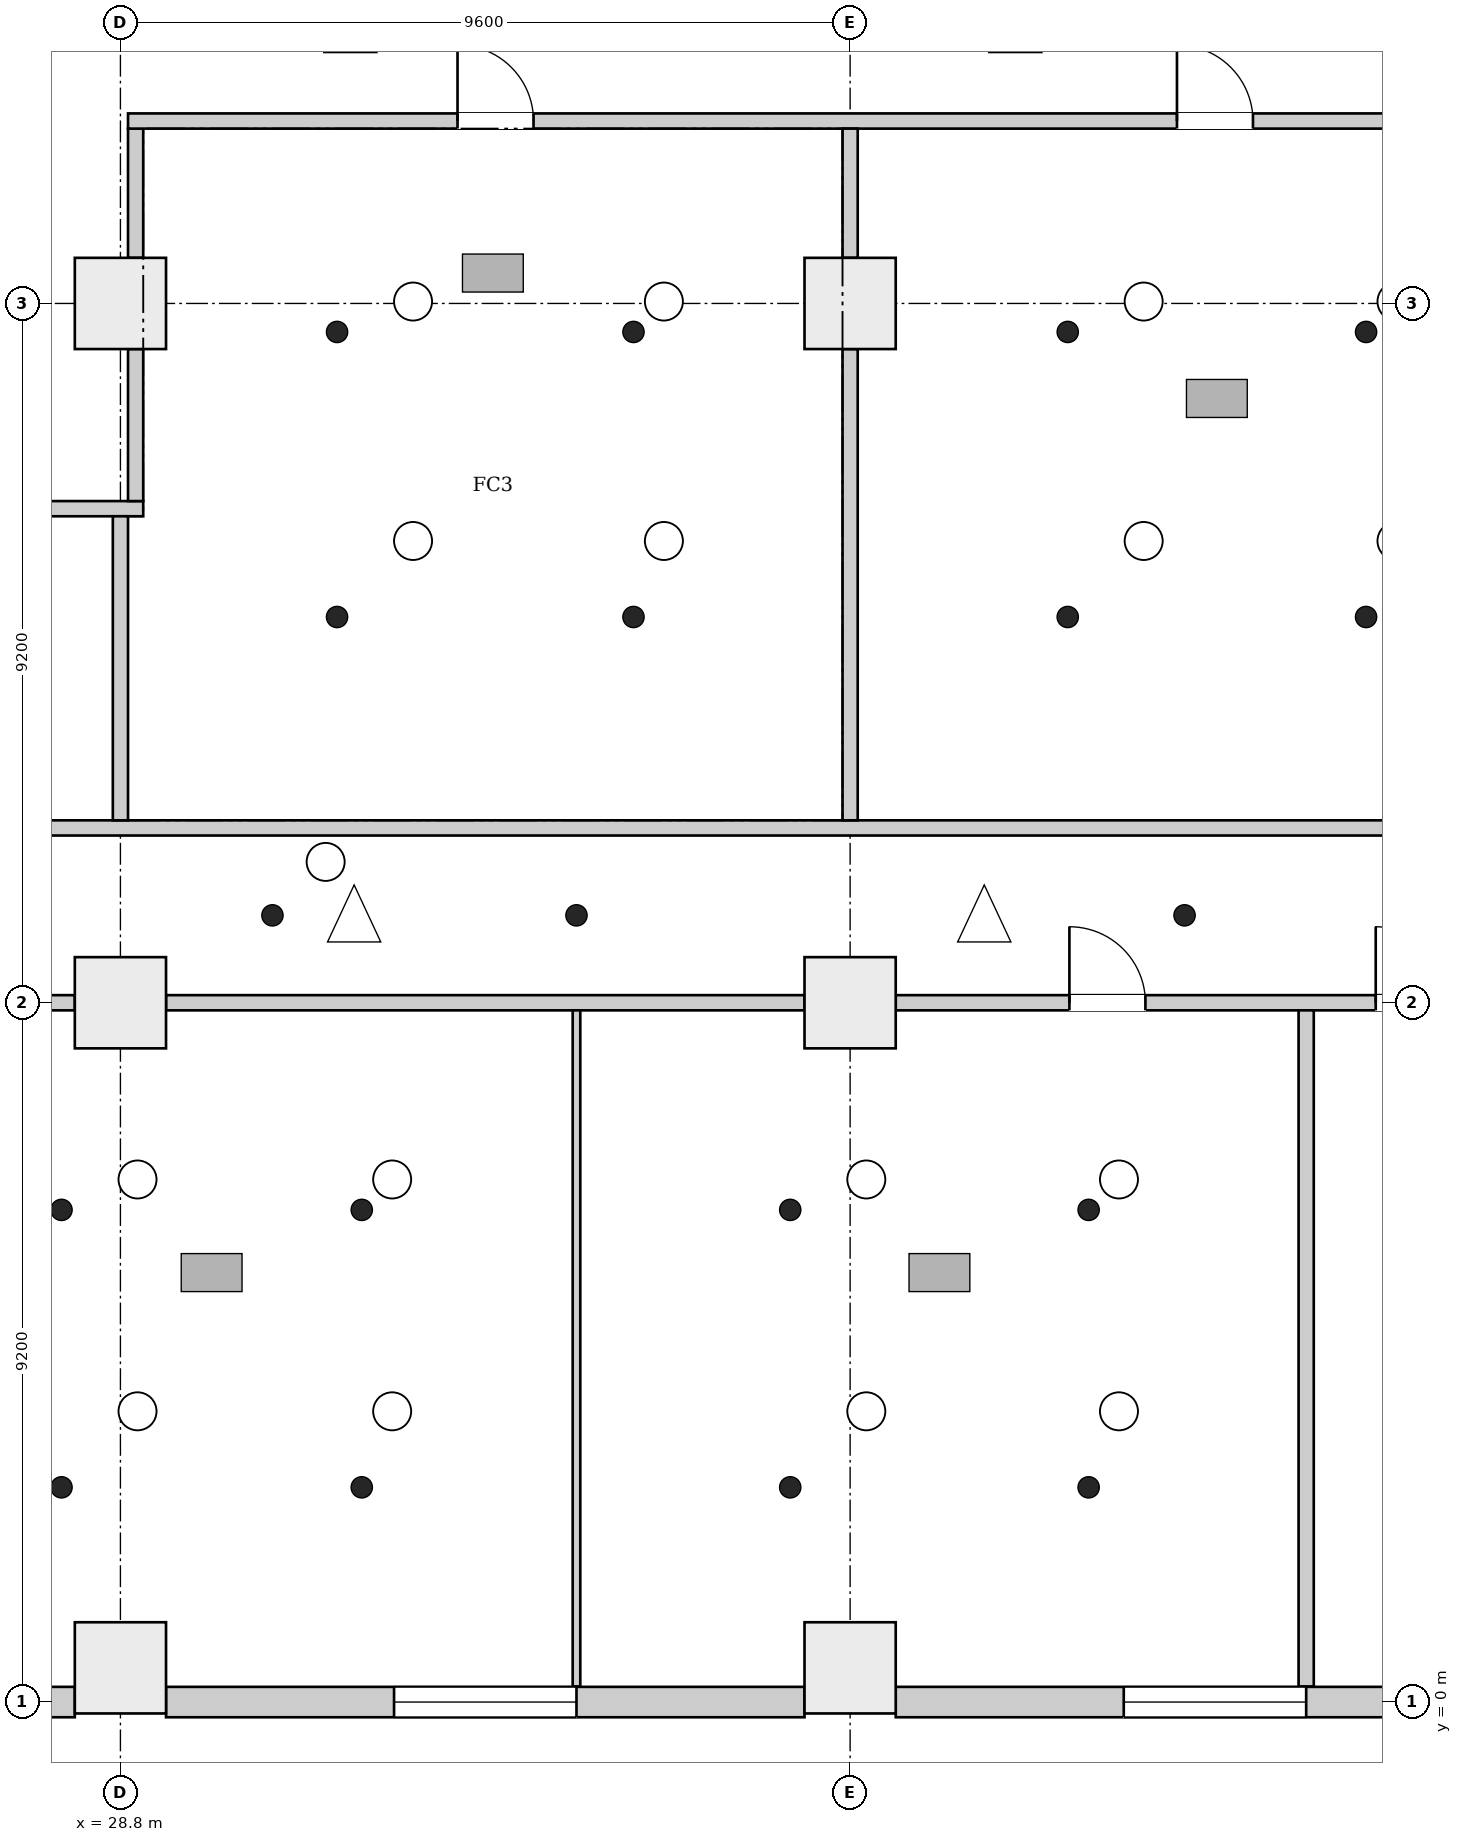
"""IFC4 building model, lengths in metres.
Left out: names, types, materials, properties, quantities, classifications, styles, units other than length and angle.
Written with IfcOpenShell. Run it as: python <this file> out.ifc"""

import sys

from ifc_helpers import new_model, si_unit, direction, frame, frame_2d, origin, origin_2d, place, context, subcontext, project, spatial, rectangle, extrude, element, fill, save


model = new_model("IFC4")
c1 = context("Model", 3, precision=1e-05, world=origin(), true_north=direction((0.0, 1.0)))
c2 = subcontext(c1, "Body", "Model", "MODEL_VIEW")
j1 = project(units=[si_unit("LENGTHUNIT", "METRE"), si_unit("PLANEANGLEUNIT", "RADIAN")], contexts=[c1])
p1 = place(None, origin())
s1 = spatial("IfcSite", under=j1, at=p1, CompositionType="ELEMENT")
p2 = place(p1, origin())
s2 = spatial("IfcBuilding", under=s1, at=p2, CompositionType="ELEMENT")
p3 = place(p2, frame((0.0, 0.0, 14.2)))
s3 = spatial("IfcBuildingStorey", under=s2, at=p3, CompositionType="ELEMENT", Elevation=14.2)
for number, where, z_axis, x_axis in (
    (1, (28.8, 0.45, 0.0), (0.0, 0.0, 1.0), (1.0, 0.0, 0.0)),
    (2, (38.4, 0.45, 0.0), (0.0, 0.0, 1.0), (1.0, 0.0, 0.0)),
    (3, (28.8, 9.2, 0.0), (0.0, 0.0, 1.0), (1.0, 0.0, 0.0)),
    (4, (38.4, 9.2, 0.0), (0.0, 0.0, 1.0), (1.0, 0.0, 0.0)),
    (5, (28.8, 18.4, 0.0), (0.0, 0.0, 1.0), (1.0, 0.0, 0.0)),
    (6, (38.4, 18.4, 0.0), (0.0, 0.0, 1.0), (1.0, 0.0, 0.0)),
):
    element("IfcColumn", number, at=place(p3, frame(where, z_axis=z_axis, x_axis=x_axis)), inside=s3, PredefinedType="COLUMN", context=c2, shape_type="SweptSolid", body=[
        extrude(rectangle(XDim=1.2, YDim=1.2, at=origin_2d()), origin(), (0.0, 0.0, 1.0), 7.5),
    ])
p4 = place(p3, frame((19.8, 0.0, 0.0), z_axis=(0.0, 0.0, 1.0), x_axis=(1.0, 0.0, 0.0)))
e7 = element("IfcWall", 7, at=p4, inside=s3, PredefinedType="ELEMENTEDWALL", context=c2, shape_type="SweptSolid", body=[
    extrude(rectangle(XDim=8.4, YDim=0.4, at=frame_2d((4.2, 0.0))), origin(), (0.0, 0.0, 1.0), 7.15),
])
p5 = place(p4, frame((3.0, 0.0, 1.0)))
e8 = element("IfcOpeningElement", 8, at=p5, cuts=e7, PredefinedType="OPENING", context=c2, shape_type="SweptSolid", body=[
    extrude(rectangle(XDim=2.4, YDim=2.2, at=frame_2d((1.2, 1.1))), frame((0.0, 0.21, 0.0), z_axis=(0.0, -1.0, 0.0), x_axis=(1.0, 0.0, 0.0)), (0.0, 0.0, 1.0), 0.42),
])
p6 = place(p3, frame((29.4, 0.0, 0.0), z_axis=(0.0, 0.0, 1.0), x_axis=(1.0, 0.0, 0.0)))
e9 = element("IfcWall", 9, at=p6, inside=s3, PredefinedType="ELEMENTEDWALL", context=c2, shape_type="SweptSolid", body=[
    extrude(rectangle(XDim=8.4, YDim=0.4, at=frame_2d((4.2, 0.0))), origin(), (0.0, 0.0, 1.0), 7.15),
])
p7 = place(p6, frame((3.0, 0.0, 1.0)))
e10 = element("IfcOpeningElement", 10, at=p7, cuts=e9, PredefinedType="OPENING", context=c2, shape_type="SweptSolid", body=[
    extrude(rectangle(XDim=2.4, YDim=2.2, at=frame_2d((1.2, 1.1))), frame((0.0, 0.21, 0.0), z_axis=(0.0, -1.0, 0.0), x_axis=(1.0, 0.0, 0.0)), (0.0, 0.0, 1.0), 0.42),
])
p8 = place(p3, frame((39.0, 0.0, 0.0), z_axis=(0.0, 0.0, 1.0), x_axis=(1.0, 0.0, 0.0)))
e11 = element("IfcWall", 11, at=p8, inside=s3, PredefinedType="ELEMENTEDWALL", context=c2, shape_type="SweptSolid", body=[
    extrude(rectangle(XDim=8.4, YDim=0.4, at=frame_2d((4.2, 0.0))), origin(), (0.0, 0.0, 1.0), 7.15),
])
p9 = place(p8, frame((3.0, 0.0, 1.0)))
e12 = element("IfcOpeningElement", 12, at=p9, cuts=e11, PredefinedType="OPENING", context=c2, shape_type="SweptSolid", body=[
    extrude(rectangle(XDim=2.4, YDim=2.2, at=frame_2d((1.2, 1.1))), frame((0.0, 0.21, 0.0), z_axis=(0.0, -1.0, 0.0), x_axis=(1.0, 0.0, 0.0)), (0.0, 0.0, 1.0), 0.42),
])
p10 = place(p3, frame((19.8, 9.2, 0.0), z_axis=(0.0, 0.0, 1.0), x_axis=(1.0, 0.0, 0.0)))
e13 = element("IfcWall", 13, at=p10, inside=s3, PredefinedType="PARTITIONING", context=c2, shape_type="SweptSolid", body=[
    extrude(rectangle(XDim=8.4, YDim=0.2, at=frame_2d((4.2, 0.0))), origin(), (0.0, 0.0, 1.0), 6.75),
])
p11 = place(p10, frame((6.315, 0.0, 0.0)))
e14 = element("IfcOpeningElement", 14, at=p11, cuts=e13, PredefinedType="OPENING", context=c2, shape_type="SweptSolid", body=[
    extrude(rectangle(XDim=1.0, YDim=2.1, at=frame_2d((0.5, 1.05))), frame((0.0, 0.11, 0.0), z_axis=(0.0, -1.0, 0.0), x_axis=(1.0, 0.0, 0.0)), (0.0, 0.0, 1.0), 0.22),
])
p12 = place(p3, frame((27.206, 11.5, 0.0), z_axis=(0.0, 0.0, 1.0), x_axis=(1.0, 0.0, 0.0)))
e15 = element("IfcWall", 15, at=p12, inside=s3, PredefinedType="PARTITIONING", context=c2, shape_type="SweptSolid", body=[
    extrude(rectangle(XDim=26.494, YDim=0.2, at=frame_2d((13.247, 0.0))), origin(), (0.0, 0.0, 1.0), 7.15),
])
p13 = place(p3, frame((27.206, 15.7, 0.0), z_axis=(0.0, 0.0, 1.0), x_axis=(1.0, 0.0, 0.0)))
e16 = element("IfcWall", 16, at=p13, inside=s3, PredefinedType="PARTITIONING", context=c2, shape_type="SweptSolid", body=[
    extrude(rectangle(XDim=1.894, YDim=0.2, at=frame_2d((0.947, 0.0))), origin(), (0.0, 0.0, 1.0), 7.15),
])
p14 = place(p3, frame((28.8, 11.6, 0.0), z_axis=(0.0, 0.0, 1.0), x_axis=(0.0, 1.0, 0.0)))
e17 = element("IfcWall", 17, at=p14, inside=s3, PredefinedType="PARTITIONING", context=c2, shape_type="SweptSolid", body=[
    extrude(rectangle(XDim=4.0, YDim=0.2, at=frame_2d((2.0, 0.0))), origin(), (0.0, 0.0, 1.0), 6.75),
])
p15 = place(p3, frame((29.0, 15.8, 0.0), z_axis=(0.0, 0.0, 1.0), x_axis=(0.0, 1.0, 0.0)))
e18 = element("IfcWall", 18, at=p15, inside=s3, PredefinedType="PARTITIONING", context=c2, shape_type="SweptSolid", body=[
    extrude(rectangle(XDim=2.0, YDim=0.2, at=frame_2d((1.0, 0.0))), origin(), (0.0, 0.0, 1.0), 6.75),
])
p16 = place(p3, frame((29.0, 19.0, 0.0), z_axis=(0.0, 0.0, 1.0), x_axis=(0.0, 1.0, 0.0)))
e19 = element("IfcWall", 19, at=p16, inside=s3, PredefinedType="PARTITIONING", context=c2, shape_type="SweptSolid", body=[
    extrude(rectangle(XDim=1.7, YDim=0.2, at=frame_2d((0.85, 0.0))), origin(), (0.0, 0.0, 1.0), 6.75),
])
p17 = place(p3, frame((28.9, 20.8, 0.0), z_axis=(0.0, 0.0, 1.0), x_axis=(1.0, 0.0, 0.0)))
e20 = element("IfcWall", 20, at=p17, inside=s3, PredefinedType="PARTITIONING", context=c2, shape_type="SweptSolid", body=[
    extrude(rectangle(XDim=28.494, YDim=0.2, at=frame_2d((14.247, 0.0))), origin(), (0.0, 0.0, 1.0), 7.15),
])
p18 = place(p17, frame((4.335, 0.0, 0.0)))
e21 = element("IfcOpeningElement", 21, at=p18, cuts=e20, PredefinedType="OPENING", context=c2, shape_type="SweptSolid", body=[
    extrude(rectangle(XDim=1.0, YDim=2.1, at=frame_2d((0.5, 1.05))), frame((0.0, 0.11, 0.0), z_axis=(0.0, -1.0, 0.0), x_axis=(1.0, 0.0, 0.0)), (0.0, 0.0, 1.0), 0.22),
])
p19 = place(p17, frame((13.8, 0.0, 0.0)))
e22 = element("IfcOpeningElement", 22, at=p19, cuts=e20, PredefinedType="OPENING", context=c2, shape_type="SweptSolid", body=[
    extrude(rectangle(XDim=1.0, YDim=2.1, at=frame_2d((0.5, 1.05))), frame((0.0, 0.11, 0.0), z_axis=(0.0, -1.0, 0.0), x_axis=(1.0, 0.0, 0.0)), (0.0, 0.0, 1.0), 0.22),
])
p20 = place(p17, frame((21.95, 0.0, 0.0)))
e23 = element("IfcOpeningElement", 23, at=p20, cuts=e20, PredefinedType="OPENING", context=c2, shape_type="SweptSolid", body=[
    extrude(rectangle(XDim=1.0, YDim=2.1, at=frame_2d((0.5, 1.05))), frame((0.0, 0.11, 0.0), z_axis=(0.0, -1.0, 0.0), x_axis=(1.0, 0.0, 0.0)), (0.0, 0.0, 1.0), 0.22),
])
p21 = place(p3, frame((29.4, 9.2, 0.0), z_axis=(0.0, 0.0, 1.0), x_axis=(1.0, 0.0, 0.0)))
e24 = element("IfcWall", 24, at=p21, inside=s3, PredefinedType="PARTITIONING", context=c2, shape_type="SweptSolid", body=[
    extrude(rectangle(XDim=8.4, YDim=0.2, at=frame_2d((4.2, 0.0))), origin(), (0.0, 0.0, 1.0), 6.75),
])
p22 = place(p3, frame((34.8, 0.206, 0.0), z_axis=(0.0, 0.0, 1.0), x_axis=(0.0, 1.0, 0.0)))
e25 = element("IfcWall", 25, at=p22, inside=s3, PredefinedType="PARTITIONING", context=c2, shape_type="SweptSolid", body=[
    extrude(rectangle(XDim=8.894, YDim=0.1, at=frame_2d((4.447, 0.0))), origin(), (0.0, 0.0, 1.0), 7.15),
])
p23 = place(p3, frame((38.4, 11.6, 0.0), z_axis=(0.0, 0.0, 1.0), x_axis=(0.0, 1.0, 0.0)))
e26 = element("IfcWall", 26, at=p23, inside=s3, PredefinedType="PARTITIONING", context=c2, shape_type="SweptSolid", body=[
    extrude(rectangle(XDim=6.2, YDim=0.2, at=frame_2d((3.1, 0.0))), origin(), (0.0, 0.0, 1.0), 6.75),
])
p24 = place(p3, frame((38.4, 19.0, 0.0), z_axis=(0.0, 0.0, 1.0), x_axis=(0.0, 1.0, 0.0)))
e27 = element("IfcWall", 27, at=p24, inside=s3, PredefinedType="PARTITIONING", context=c2, shape_type="SweptSolid", body=[
    extrude(rectangle(XDim=1.7, YDim=0.2, at=frame_2d((0.85, 0.0))), origin(), (0.0, 0.0, 1.0), 6.75),
])
p25 = place(p3, frame((39.0, 9.2, 0.0), z_axis=(0.0, 0.0, 1.0), x_axis=(1.0, 0.0, 0.0)))
e28 = element("IfcWall", 28, at=p25, inside=s3, PredefinedType="PARTITIONING", context=c2, shape_type="SweptSolid", body=[
    extrude(rectangle(XDim=8.4, YDim=0.2, at=frame_2d((4.2, 0.0))), origin(), (0.0, 0.0, 1.0), 6.75),
])
p26 = place(p25, frame((2.285, 0.0, 0.0)))
e29 = element("IfcOpeningElement", 29, at=p26, cuts=e28, PredefinedType="OPENING", context=c2, shape_type="SweptSolid", body=[
    extrude(rectangle(XDim=1.0, YDim=2.1, at=frame_2d((0.5, 1.05))), frame((0.0, 0.11, 0.0), z_axis=(0.0, -1.0, 0.0), x_axis=(1.0, 0.0, 0.0)), (0.0, 0.0, 1.0), 0.22),
])
p27 = place(p25, frame((6.315, 0.0, 0.0)))
e30 = element("IfcOpeningElement", 30, at=p27, cuts=e28, PredefinedType="OPENING", context=c2, shape_type="SweptSolid", body=[
    extrude(rectangle(XDim=1.0, YDim=2.1, at=frame_2d((0.5, 1.05))), frame((0.0, 0.11, 0.0), z_axis=(0.0, -1.0, 0.0), x_axis=(1.0, 0.0, 0.0)), (0.0, 0.0, 1.0), 0.22),
])
p28 = place(p3, frame((44.4, 0.206, 0.0), z_axis=(0.0, 0.0, 1.0), x_axis=(0.0, 1.0, 0.0)))
e31 = element("IfcWall", 31, at=p28, inside=s3, PredefinedType="PARTITIONING", context=c2, shape_type="SweptSolid", body=[
    extrude(rectangle(XDim=8.894, YDim=0.2, at=frame_2d((4.447, 0.0))), origin(), (0.0, 0.0, 1.0), 7.15),
])
p29 = place(p7, origin())
e32 = element("IfcWindow", 32, at=p29, inside=s3, PartitioningType="SINGLE_PANEL", PredefinedType="WINDOW", context=c2, shape_type="SweptSolid", body=[
    extrude(rectangle(XDim=2.4, YDim=2.2, at=frame_2d((1.2, 1.1))), frame((0.0, 0.03, 0.0), z_axis=(0.0, -1.0, 0.0), x_axis=(1.0, 0.0, 0.0)), (0.0, 0.0, 1.0), 0.06),
])
fill(e10, e32)
p30 = place(p9, origin())
e33 = element("IfcWindow", 33, at=p30, inside=s3, PartitioningType="SINGLE_PANEL", PredefinedType="WINDOW", context=c2, shape_type="SweptSolid", body=[
    extrude(rectangle(XDim=2.4, YDim=2.2, at=frame_2d((1.2, 1.1))), frame((0.0, 0.03, 0.0), z_axis=(0.0, -1.0, 0.0), x_axis=(1.0, 0.0, 0.0)), (0.0, 0.0, 1.0), 0.06),
])
fill(e12, e33)
p31 = place(p18, origin())
e34 = element("IfcDoor", 34, at=p31, inside=s3, OperationType="SINGLE_SWING_LEFT", PredefinedType="DOOR", context=c2, shape_type="SweptSolid", body=[
    extrude(rectangle(XDim=1.0, YDim=2.1, at=frame_2d((0.5, 1.05))), frame((0.0, 0.025, 0.0), z_axis=(0.0, -1.0, 0.0), x_axis=(1.0, 0.0, 0.0)), (0.0, 0.0, 1.0), 0.05),
])
fill(e21, e34)
p32 = place(p19, origin())
e35 = element("IfcDoor", 35, at=p32, inside=s3, OperationType="SINGLE_SWING_LEFT", PredefinedType="DOOR", context=c2, shape_type="SweptSolid", body=[
    extrude(rectangle(XDim=1.0, YDim=2.1, at=frame_2d((0.5, 1.05))), frame((0.0, 0.025, 0.0), z_axis=(0.0, -1.0, 0.0), x_axis=(1.0, 0.0, 0.0)), (0.0, 0.0, 1.0), 0.05),
])
fill(e22, e35)
p33 = place(p26, origin())
e36 = element("IfcDoor", 36, at=p33, inside=s3, OperationType="SINGLE_SWING_RIGHT", PredefinedType="DOOR", context=c2, shape_type="SweptSolid", body=[
    extrude(rectangle(XDim=1.0, YDim=2.1, at=frame_2d((0.5, 1.05))), frame((0.0, 0.025, 0.0), z_axis=(0.0, -1.0, 0.0), x_axis=(1.0, 0.0, 0.0)), (0.0, 0.0, 1.0), 0.05),
])
fill(e29, e36)
p34 = place(p27, origin())
e37 = element("IfcDoor", 37, at=p34, inside=s3, OperationType="SINGLE_SWING_RIGHT", PredefinedType="DOOR", context=c2, shape_type="SweptSolid", body=[
    extrude(rectangle(XDim=1.0, YDim=2.1, at=frame_2d((0.5, 1.05))), frame((0.0, 0.025, 0.0), z_axis=(0.0, -1.0, 0.0), x_axis=(1.0, 0.0, 0.0)), (0.0, 0.0, 1.0), 0.05),
])
fill(e30, e37)
save(model, sys.argv[1])
